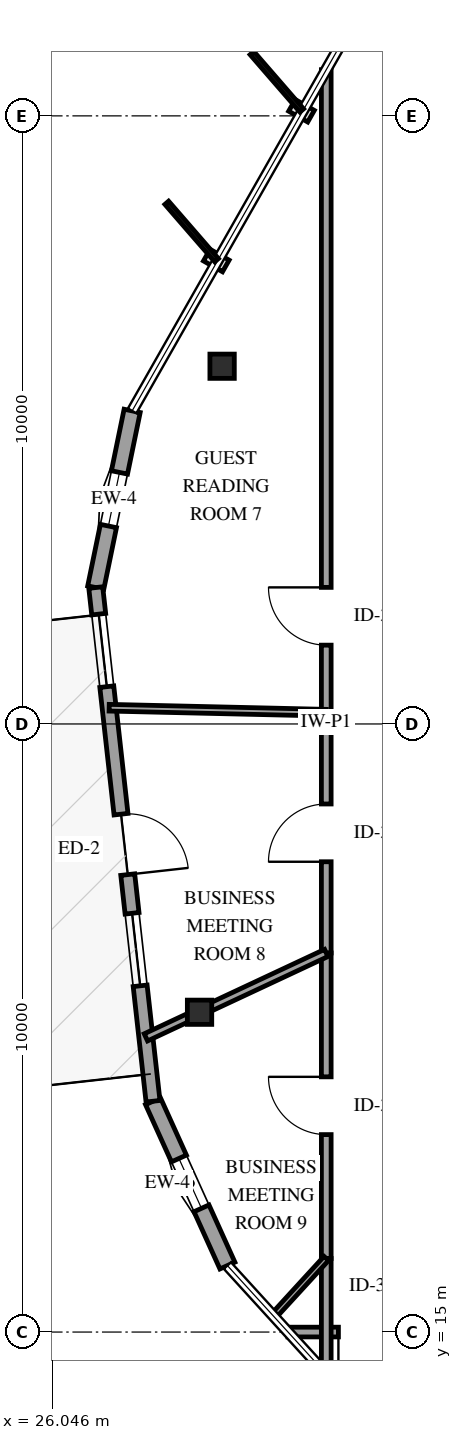
"""IFC4 building model, lengths in metres.
Left out: names, types, materials, properties, quantities, classifications, styles, units other than length and angle.
Written with IfcOpenShell. Run it as: python <this file> out.ifc"""

import sys

from ifc_helpers import new_model, si_unit, direction, frame, frame_2d, origin, origin_2d, place, context, subcontext, project, spatial, rectangle, i_section, extrude, element, fill, save


model = new_model("IFC4")
c1 = context("Model", 3, precision=1e-05, world=origin(), true_north=direction((0.0, 1.0)))
c2 = subcontext(c1, "Body", "Model", "MODEL_VIEW")
j1 = project(units=[si_unit("LENGTHUNIT", "METRE"), si_unit("PLANEANGLEUNIT", "RADIAN")], contexts=[c1])
p1 = place(None, origin())
s1 = spatial("IfcSite", under=j1, at=p1, CompositionType="ELEMENT")
p2 = place(p1, origin())
s2 = spatial("IfcBuilding", under=s1, at=p2, CompositionType="ELEMENT")
p3 = place(p2, frame((0.0, 0.0, 257.5)))
s3 = spatial("IfcBuildingStorey", under=s2, at=p3, CompositionType="ELEMENT", Elevation=257.5)
for number, where, z_axis, x_axis in (
    (1, (28.837, 30.883, 0.0), (0.0, 0.0, 1.0), (1.0, 0.0, 0.0)),
    (2, (28.466, 20.259, 0.0), (0.0, 0.0, 1.0), (1.0, 0.0, 0.0)),
):
    element("IfcColumn", number, at=place(p3, frame(where, z_axis=z_axis, x_axis=x_axis)), inside=s3, PredefinedType="COLUMN", context=c2, shape_type="SweptSolid", body=[
        extrude(i_section(OverallWidth=0.401, OverallDepth=0.399, WebThickness=0.025, FlangeThickness=0.04, FilletRadius=0.038, at=origin_2d()), origin(), (0.0, 0.0, 1.0), 3.75),
    ])
p4 = place(p3, frame((27.358, 30.149, 0.0), z_axis=(0.0, 0.0, 1.0), x_axis=(-0.201715617992, -0.979444132893, 0.0)))
e3 = element("IfcWall", 3, at=p4, inside=s3, PredefinedType="SOLIDWALL", context=c2, shape_type="SweptSolid", body=[
    extrude(rectangle(XDim=2.967, YDim=0.27, at=frame_2d((1.483, 0.0))), origin(), (0.0, 0.0, 1.0), 2.829),
])
p5 = place(p4, frame((1.033, 0.0, 0.75)))
e4 = element("IfcOpeningElement", 4, at=p5, cuts=e3, PredefinedType="OPENING", context=c2, shape_type="SweptSolid", body=[
    extrude(rectangle(XDim=0.9, YDim=1.5, at=frame_2d((0.45, 0.75))), frame((0.0, 0.145, 0.0), z_axis=(0.0, -1.0, 0.0), x_axis=(1.0, 0.0, 0.0)), (0.0, 0.0, 1.0), 0.29),
])
p6 = place(p3, frame((27.701, 18.796, 0.0), z_axis=(0.0, 0.0, 1.0), x_axis=(0.412481781571, -0.910965850003, 0.0)))
e5 = element("IfcWall", 5, at=p6, inside=s3, PredefinedType="SOLIDWALL", context=c2, shape_type="SweptSolid", body=[
    extrude(rectangle(XDim=2.967, YDim=0.27, at=frame_2d((1.483, 0.0))), origin(), (0.0, 0.0, 1.0), 2.829),
])
p7 = place(p6, frame((1.033, 0.0, 0.75)))
e6 = element("IfcOpeningElement", 6, at=p7, cuts=e5, PredefinedType="OPENING", context=c2, shape_type="SweptSolid", body=[
    extrude(rectangle(XDim=0.9, YDim=1.5, at=frame_2d((0.45, 0.75))), frame((0.0, 0.145, 0.0), z_axis=(0.0, -1.0, 0.0), x_axis=(1.0, 0.0, 0.0)), (0.0, 0.0, 1.0), 0.29),
])
p8 = place(p3, frame((26.76, 27.243, 0.0), z_axis=(0.0, 0.0, 1.0), x_axis=(0.1107562312, -0.993847602629, 0.0)))
e7 = element("IfcWall", 7, at=p8, inside=s3, PredefinedType="SOLIDWALL", context=c2, shape_type="SweptSolid", body=[
    extrude(rectangle(XDim=8.5, YDim=0.23, at=frame_2d((4.25, 0.0))), origin(), (0.0, 0.0, 1.0), 2.829),
])
p9 = place(p8, frame((3.75, 0.0, 0.0)))
e8 = element("IfcOpeningElement", 8, at=p9, cuts=e7, PredefinedType="OPENING", context=c2, shape_type="SweptSolid", body=[
    extrude(rectangle(XDim=1.0, YDim=2.15, at=frame_2d((0.5, 1.075))), frame((0.0, 0.125, 0.0), z_axis=(0.0, -1.0, 0.0), x_axis=(1.0, 0.0, 0.0)), (0.0, 0.0, 1.0), 0.25),
])
p10 = place(p8, frame((0.44, 0.0, 0.72)))
e9 = element("IfcOpeningElement", 9, at=p10, cuts=e7, PredefinedType="OPENING", context=c2, shape_type="SweptSolid", body=[
    extrude(rectangle(XDim=1.2, YDim=1.6, at=frame_2d((0.6, 0.8))), frame((0.0, 0.125, 0.0), z_axis=(0.0, -1.0, 0.0), x_axis=(1.0, 0.0, 0.0)), (0.0, 0.0, 1.0), 0.25),
])
p11 = place(p8, frame((5.39, 0.0, 0.72)))
e10 = element("IfcOpeningElement", 10, at=p11, cuts=e7, PredefinedType="OPENING", context=c2, shape_type="SweptSolid", body=[
    extrude(rectangle(XDim=1.2, YDim=1.6, at=frame_2d((0.6, 0.8))), frame((0.0, 0.125, 0.0), z_axis=(0.0, -1.0, 0.0), x_axis=(1.0, 0.0, 0.0)), (0.0, 0.0, 1.0), 0.25),
])
p12 = place(p3, frame((30.55, 25.185, 0.0), z_axis=(0.0, 0.0, 1.0), x_axis=(0.0, 1.0, 0.0)))
e11 = element("IfcWall", 11, at=p12, inside=s3, PredefinedType="PARTITIONING", context=c2, shape_type="SweptSolid", body=[
    extrude(rectangle(XDim=10.574, YDim=0.16, at=frame_2d((5.287, 0.0))), origin(), (0.0, 0.0, 1.0), 3.45),
])
p13 = place(p12, frame((1.111, 0.0, 0.0)))
e12 = element("IfcOpeningElement", 12, at=p13, cuts=e11, PredefinedType="OPENING", context=c2, shape_type="SweptSolid", body=[
    extrude(rectangle(XDim=0.95, YDim=2.15, at=frame_2d((0.475, 1.075))), frame((0.0, 0.09, 0.0), z_axis=(0.0, -1.0, 0.0), x_axis=(1.0, 0.0, 0.0)), (0.0, 0.0, 1.0), 0.18),
])
p14 = place(p3, frame((30.55, 16.21, 0.0), z_axis=(0.0, 0.0, 1.0), x_axis=(0.0, 1.0, 0.0)))
e13 = element("IfcWall", 13, at=p14, inside=s3, PredefinedType="PARTITIONING", context=c2, shape_type="SweptSolid", body=[
    extrude(rectangle(XDim=5.024, YDim=0.16, at=frame_2d((2.512, 0.0))), origin(), (0.0, 0.0, 1.0), 3.45),
])
p15 = place(p14, frame((2.037, 0.0, 0.0)))
e14 = element("IfcOpeningElement", 14, at=p15, cuts=e13, PredefinedType="OPENING", context=c2, shape_type="SweptSolid", body=[
    extrude(rectangle(XDim=0.95, YDim=2.15, at=frame_2d((0.475, 1.075))), frame((0.0, 0.09, 0.0), z_axis=(0.0, -1.0, 0.0), x_axis=(1.0, 0.0, 0.0)), (0.0, 0.0, 1.0), 0.18),
])
p16 = place(p3, frame((30.55, 21.234, 0.0), z_axis=(0.0, 0.0, 1.0), x_axis=(0.0, 1.0, 0.0)))
e15 = element("IfcWall", 15, at=p16, inside=s3, PredefinedType="PARTITIONING", context=c2, shape_type="SweptSolid", body=[
    extrude(rectangle(XDim=3.951, YDim=0.16, at=frame_2d((1.976, 0.0))), origin(), (0.0, 0.0, 1.0), 3.45),
])
p17 = place(p16, frame((1.5, 0.0, 0.0)))
e16 = element("IfcOpeningElement", 16, at=p17, cuts=e15, PredefinedType="OPENING", context=c2, shape_type="SweptSolid", body=[
    extrude(rectangle(XDim=0.95, YDim=2.15, at=frame_2d((0.475, 1.075))), frame((0.0, 0.09, 0.0), z_axis=(0.0, -1.0, 0.0), x_axis=(1.0, 0.0, 0.0)), (0.0, 0.0, 1.0), 0.18),
])
p18 = place(p3, frame((30.55, 25.185, 0.0), z_axis=(0.0, 0.0, 1.0), x_axis=(-0.999736121704, 0.022971437933, 0.0)))
e17 = element("IfcWall", 17, at=p18, inside=s3, PredefinedType="PARTITIONING", context=c2, shape_type="SweptSolid", body=[
    extrude(rectangle(XDim=3.571, YDim=0.11, at=frame_2d((1.786, 0.0))), origin(), (0.0, 0.0, 1.0), 3.45),
])
p19 = place(p3, frame((30.55, 21.234, 0.0), z_axis=(0.0, 0.0, 1.0), x_axis=(-0.905740770893, -0.423832108201, 0.0)))
e18 = element("IfcWall", 18, at=p19, inside=s3, PredefinedType="PARTITIONING", context=c2, shape_type="SweptSolid", body=[
    extrude(rectangle(XDim=3.275, YDim=0.13, at=frame_2d((1.637, 0.0))), origin(), (0.0, 0.0, 1.0), 3.45),
])
p20 = place(p3, frame((32.53, 15.0, 0.0), z_axis=(0.0, 0.0, 1.0), x_axis=(-1.0, 0.0, 0.0)))
e19 = element("IfcWall", 19, at=p20, inside=s3, PredefinedType="PARTITIONING", context=c2, shape_type="SweptSolid", body=[
    extrude(rectangle(XDim=2.609, YDim=0.16, at=frame_2d((1.305, 0.0))), origin(), (0.0, 0.0, 1.0), 3.45),
])
p21 = place(p20, frame((0.83, 0.0, 0.0)))
e20 = element("IfcOpeningElement", 20, at=p21, cuts=e19, PredefinedType="OPENING", context=c2, shape_type="SweptSolid", body=[
    extrude(rectangle(XDim=0.95, YDim=2.15, at=frame_2d((0.475, 1.075))), frame((0.0, 0.09, 0.0), z_axis=(0.0, -1.0, 0.0), x_axis=(1.0, 0.0, 0.0)), (0.0, 0.0, 1.0), 0.18),
])
p22 = place(p3, frame((30.55, 14.311, 0.0), z_axis=(0.0, 0.0, 1.0), x_axis=(0.0, 1.0, 0.0)))
e21 = element("IfcWall", 21, at=p22, inside=s3, PredefinedType="PARTITIONING", context=c2, shape_type="SweptSolid", body=[
    extrude(rectangle(XDim=1.899, YDim=0.16, at=frame_2d((0.949, 0.0))), origin(), (0.0, 0.0, 1.0), 3.45),
])
p23 = place(p3, frame((30.55, 16.21, 0.0), z_axis=(0.0, 0.0, 1.0), x_axis=(-0.675750443643, -0.737130475504, 0.0)))
e22 = element("IfcWall", 22, at=p23, inside=s3, PredefinedType="PARTITIONING", context=c2, shape_type="SweptSolid", body=[
    extrude(rectangle(XDim=1.285, YDim=0.1, at=frame_2d((0.642, 0.0))), origin(), (0.0, 0.0, 1.0), 3.45),
])
p24 = place(p5, origin())
e23 = element("IfcWindow", 23, at=p24, inside=s3, PartitioningType="SINGLE_PANEL", PredefinedType="WINDOW", context=c2, shape_type="SweptSolid", body=[
    extrude(rectangle(XDim=0.9, YDim=1.5, at=frame_2d((0.45, 0.75))), frame((0.0, 0.03, 0.0), z_axis=(0.0, -1.0, 0.0), x_axis=(1.0, 0.0, 0.0)), (0.0, 0.0, 1.0), 0.06),
])
fill(e4, e23)
p25 = place(p7, origin())
e24 = element("IfcWindow", 24, at=p25, inside=s3, PartitioningType="SINGLE_PANEL", PredefinedType="WINDOW", context=c2, shape_type="SweptSolid", body=[
    extrude(rectangle(XDim=0.9, YDim=1.5, at=frame_2d((0.45, 0.75))), frame((0.0, 0.03, 0.0), z_axis=(0.0, -1.0, 0.0), x_axis=(1.0, 0.0, 0.0)), (0.0, 0.0, 1.0), 0.06),
])
fill(e6, e24)
p26 = place(p9, origin())
e25 = element("IfcDoor", 25, at=p26, inside=s3, OperationType="SINGLE_SWING_RIGHT", PredefinedType="DOOR", context=c2, shape_type="SweptSolid", body=[
    extrude(rectangle(XDim=1.0, YDim=2.15, at=frame_2d((0.5, 1.075))), frame((0.0, 0.025, 0.0), z_axis=(0.0, -1.0, 0.0), x_axis=(1.0, 0.0, 0.0)), (0.0, 0.0, 1.0), 0.05),
])
fill(e8, e25)
p27 = place(p10, origin())
e26 = element("IfcWindow", 26, at=p27, inside=s3, PartitioningType="SINGLE_PANEL", PredefinedType="WINDOW", context=c2, shape_type="SweptSolid", body=[
    extrude(rectangle(XDim=1.2, YDim=1.6, at=frame_2d((0.6, 0.8))), frame((0.0, 0.03, 0.0), z_axis=(0.0, -1.0, 0.0), x_axis=(1.0, 0.0, 0.0)), (0.0, 0.0, 1.0), 0.06),
])
fill(e9, e26)
p28 = place(p11, origin())
e27 = element("IfcWindow", 27, at=p28, inside=s3, PartitioningType="SINGLE_PANEL", PredefinedType="WINDOW", context=c2, shape_type="SweptSolid", body=[
    extrude(rectangle(XDim=1.2, YDim=1.6, at=frame_2d((0.6, 0.8))), frame((0.0, 0.03, 0.0), z_axis=(0.0, -1.0, 0.0), x_axis=(1.0, 0.0, 0.0)), (0.0, 0.0, 1.0), 0.06),
])
fill(e10, e27)
p29 = place(p13, origin())
e28 = element("IfcDoor", 28, at=p29, inside=s3, OperationType="SINGLE_SWING_RIGHT", PredefinedType="DOOR", context=c2, shape_type="SweptSolid", body=[
    extrude(rectangle(XDim=0.95, YDim=2.15, at=frame_2d((0.475, 1.075))), frame((0.0, 0.025, 0.0), z_axis=(0.0, -1.0, 0.0), x_axis=(1.0, 0.0, 0.0)), (0.0, 0.0, 1.0), 0.05),
])
fill(e12, e28)
p30 = place(p15, origin())
e29 = element("IfcDoor", 29, at=p30, inside=s3, OperationType="SINGLE_SWING_RIGHT", PredefinedType="DOOR", context=c2, shape_type="SweptSolid", body=[
    extrude(rectangle(XDim=0.95, YDim=2.15, at=frame_2d((0.475, 1.075))), frame((0.0, 0.025, 0.0), z_axis=(0.0, -1.0, 0.0), x_axis=(1.0, 0.0, 0.0)), (0.0, 0.0, 1.0), 0.05),
])
fill(e14, e29)
p31 = place(p17, origin())
e30 = element("IfcDoor", 30, at=p31, inside=s3, OperationType="SINGLE_SWING_LEFT", PredefinedType="DOOR", context=c2, shape_type="SweptSolid", body=[
    extrude(rectangle(XDim=0.95, YDim=2.15, at=frame_2d((0.475, 1.075))), frame((0.0, 0.025, 0.0), z_axis=(0.0, -1.0, 0.0), x_axis=(1.0, 0.0, 0.0)), (0.0, 0.0, 1.0), 0.05),
])
fill(e16, e30)
p32 = place(p21, origin())
e31 = element("IfcDoor", 31, at=p32, inside=s3, OperationType="SINGLE_SWING_RIGHT", PredefinedType="DOOR", context=c2, shape_type="SweptSolid", body=[
    extrude(rectangle(XDim=0.95, YDim=2.15, at=frame_2d((0.475, 1.075))), frame((0.0, 0.025, 0.0), z_axis=(0.0, -1.0, 0.0), x_axis=(1.0, 0.0, 0.0)), (0.0, 0.0, 1.0), 0.05),
])
fill(e20, e31)
save(model, sys.argv[1])
